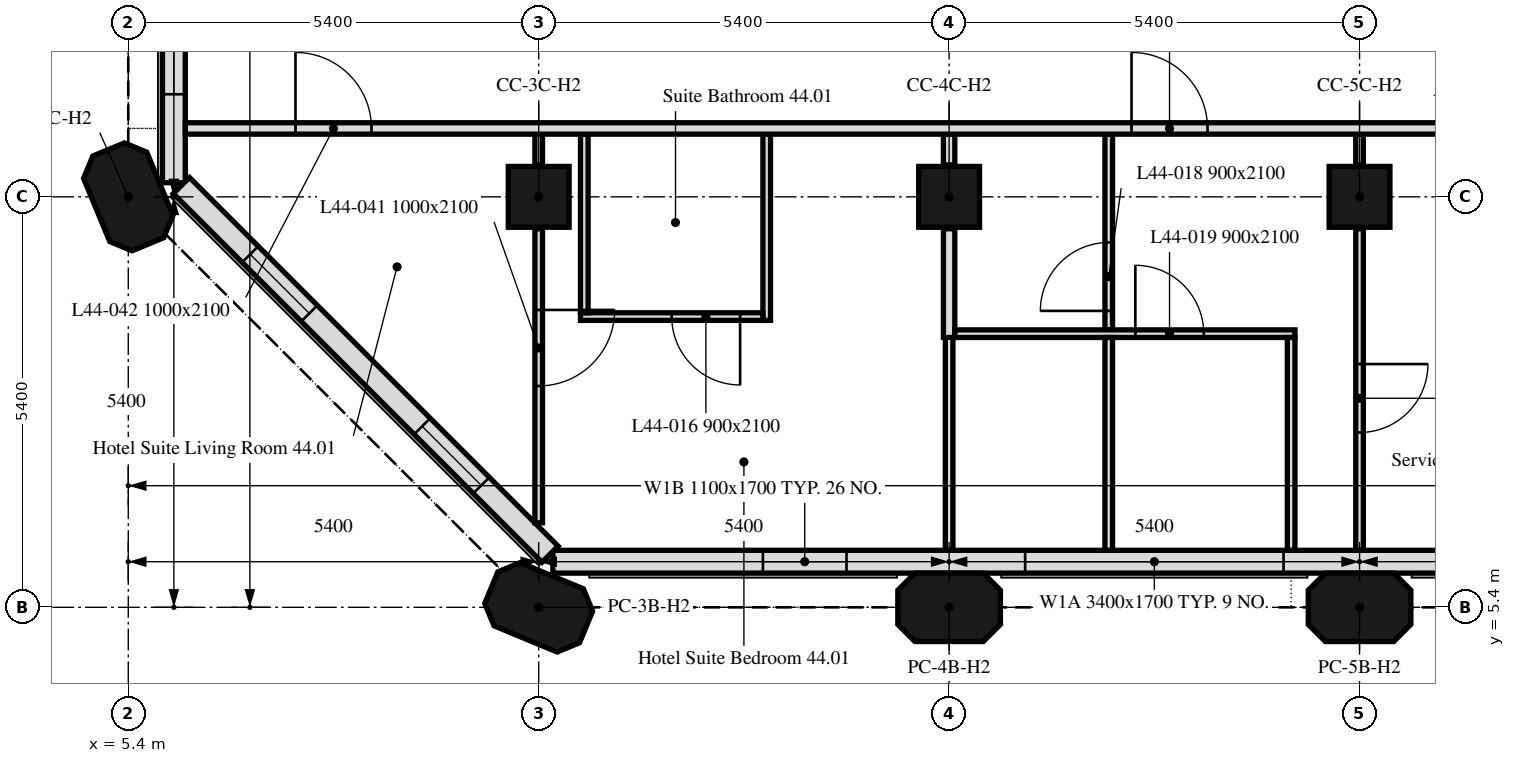
"""IFC4 building model, lengths in metres.
Left out: names, types, materials, properties, quantities, classifications, styles, units other than length and angle.
Written with IfcOpenShell. Run it as: python <this file> out.ifc"""

import sys

from ifc_helpers import new_model, si_unit, direction, frame, frame_2d, origin, origin_2d, place, context, subcontext, project, spatial, polyline, rectangle, outline, extrude, element, fill, save


model = new_model("IFC4")
c1 = context("Model", 3, precision=1e-05, world=origin(), true_north=direction((0.0, 1.0)))
c2 = subcontext(c1, "Body", "Model", "MODEL_VIEW")
j1 = project(units=[si_unit("LENGTHUNIT", "METRE"), si_unit("PLANEANGLEUNIT", "RADIAN")], contexts=[c1])
p1 = place(None, origin())
s1 = spatial("IfcSite", under=j1, at=p1, CompositionType="ELEMENT")
p2 = place(p1, origin())
s2 = spatial("IfcBuilding", under=s1, at=p2, CompositionType="ELEMENT")
p3 = place(p2, frame((0.0, 0.0, 184.0)))
s3 = spatial("IfcBuildingStorey", under=s2, at=p3, CompositionType="ELEMENT", Elevation=184.0)
for number, where, z_axis, x_axis in (
    (1, (10.8, 5.4, 0.0), (0.0, 0.0, 1.0), (-0.924, 0.383, 0.0)),
    (2, (16.2, 5.4, 0.0), (0.0, 0.0, 1.0), (1.0, 0.0, 0.0)),
    (3, (21.6, 5.4, 0.0), (0.0, 0.0, 1.0), (1.0, 0.0, 0.0)),
    (4, (5.4, 10.8, 0.0), (0.0, 0.0, 1.0), (-0.383, 0.924, 0.0)),
):
    element("IfcColumn", number, at=place(p3, frame(where, z_axis=z_axis, x_axis=x_axis)), inside=s3, PredefinedType="COLUMN", context=c2, shape_type="SweptSolid", body=[
        extrude(outline(polyline([(-0.45, -0.45), (0.45, -0.45), (0.675, -0.225), (0.675, 0.225), (0.45, 0.45), (-0.45, 0.45), (-0.675, 0.225), (-0.675, -0.225), (-0.45, -0.45)])), origin(), (0.0, 0.0, 1.0), 3.0),
    ])
for number, where, z_axis, x_axis in (
    (5, (10.8, 10.8, 0.0), (0.0, 0.0, 1.0), (1.0, 0.0, 0.0)),
    (6, (16.2, 10.8, 0.0), (0.0, 0.0, 1.0), (1.0, 0.0, 0.0)),
    (7, (21.6, 10.8, 0.0), (0.0, 0.0, 1.0), (1.0, 0.0, 0.0)),
):
    element("IfcColumn", number, at=place(p3, frame(where, z_axis=z_axis, x_axis=x_axis)), inside=s3, PredefinedType="COLUMN", context=c2, shape_type="SweptSolid", body=[
        extrude(rectangle(XDim=0.8, YDim=0.8, at=origin_2d()), origin(), (0.0, 0.0, 1.0), 3.0),
    ])
p4 = place(p3, frame((10.986, 6.0, 0.0), z_axis=(0.0, 0.0, 1.0), x_axis=(1.0, 0.0, 0.0)))
e8 = element("IfcWall", 8, at=p4, inside=s3, PredefinedType="SOLIDWALL", context=c2, shape_type="SweptSolid", body=[
    extrude(rectangle(XDim=32.027, YDim=0.3, at=frame_2d((16.014, 0.0))), origin(), (0.0, 0.0, 1.0), 3.0),
])
p5 = place(p4, frame((2.764, 0.0, 0.9)))
e9 = element("IfcOpeningElement", 9, at=p5, cuts=e8, PredefinedType="OPENING", context=c2, shape_type="SweptSolid", body=[
    extrude(rectangle(XDim=1.1, YDim=1.7, at=frame_2d((0.55, 0.85))), frame((0.0, 0.16, 0.0), z_axis=(0.0, -1.0, 0.0), x_axis=(1.0, 0.0, 0.0)), (0.0, 0.0, 1.0), 0.32),
])
p6 = place(p4, frame((6.214, 0.0, 0.9)))
e10 = element("IfcOpeningElement", 10, at=p6, cuts=e8, PredefinedType="OPENING", context=c2, shape_type="SweptSolid", body=[
    extrude(rectangle(XDim=3.4, YDim=1.7, at=frame_2d((1.7, 0.85))), frame((0.0, 0.16, 0.0), z_axis=(0.0, -1.0, 0.0), x_axis=(1.0, 0.0, 0.0)), (0.0, 0.0, 1.0), 0.32),
])
p7 = place(p4, frame((13.564, 0.0, 0.9)))
e11 = element("IfcOpeningElement", 11, at=p7, cuts=e8, PredefinedType="OPENING", context=c2, shape_type="SweptSolid", body=[
    extrude(rectangle(XDim=1.1, YDim=1.7, at=frame_2d((0.55, 0.85))), frame((0.0, 0.16, 0.0), z_axis=(0.0, -1.0, 0.0), x_axis=(1.0, 0.0, 0.0)), (0.0, 0.0, 1.0), 0.32),
])
p8 = place(p4, frame((17.014, 0.0, 0.9)))
e12 = element("IfcOpeningElement", 12, at=p8, cuts=e8, PredefinedType="OPENING", context=c2, shape_type="SweptSolid", body=[
    extrude(rectangle(XDim=3.4, YDim=1.7, at=frame_2d((1.7, 0.85))), frame((0.0, 0.16, 0.0), z_axis=(0.0, -1.0, 0.0), x_axis=(1.0, 0.0, 0.0)), (0.0, 0.0, 1.0), 0.32),
])
p9 = place(p4, frame((24.364, 0.0, 0.9)))
e13 = element("IfcOpeningElement", 13, at=p9, cuts=e8, PredefinedType="OPENING", context=c2, shape_type="SweptSolid", body=[
    extrude(rectangle(XDim=1.1, YDim=1.7, at=frame_2d((0.55, 0.85))), frame((0.0, 0.16, 0.0), z_axis=(0.0, -1.0, 0.0), x_axis=(1.0, 0.0, 0.0)), (0.0, 0.0, 1.0), 0.32),
])
p10 = place(p4, frame((27.814, 0.0, 0.9)))
e14 = element("IfcOpeningElement", 14, at=p10, cuts=e8, PredefinedType="OPENING", context=c2, shape_type="SweptSolid", body=[
    extrude(rectangle(XDim=3.4, YDim=1.7, at=frame_2d((1.7, 0.85))), frame((0.0, 0.16, 0.0), z_axis=(0.0, -1.0, 0.0), x_axis=(1.0, 0.0, 0.0)), (0.0, 0.0, 1.0), 0.32),
])
p11 = place(p3, frame((6.0, 16.2, 0.0), z_axis=(0.0, 0.0, 1.0), x_axis=(0.0, -1.0, 0.0)))
e15 = element("IfcWall", 15, at=p11, inside=s3, PredefinedType="SOLIDWALL", context=c2, shape_type="SweptSolid", body=[
    extrude(rectangle(XDim=5.214, YDim=0.3, at=frame_2d((2.607, 0.0))), origin(), (0.0, 0.0, 1.0), 3.0),
])
p12 = place(p11, frame((1.35, 0.0, 0.9)))
e16 = element("IfcOpeningElement", 16, at=p12, cuts=e15, PredefinedType="OPENING", context=c2, shape_type="SweptSolid", body=[
    extrude(rectangle(XDim=1.1, YDim=1.7, at=frame_2d((0.55, 0.85))), frame((0.0, 0.16, 0.0), z_axis=(0.0, -1.0, 0.0), x_axis=(1.0, 0.0, 0.0)), (0.0, 0.0, 1.0), 0.32),
])
p13 = place(p11, frame((2.95, 0.0, 0.9)))
e17 = element("IfcOpeningElement", 17, at=p13, cuts=e15, PredefinedType="OPENING", context=c2, shape_type="SweptSolid", body=[
    extrude(rectangle(XDim=1.1, YDim=1.7, at=frame_2d((0.55, 0.85))), frame((0.0, 0.16, 0.0), z_axis=(0.0, -1.0, 0.0), x_axis=(1.0, 0.0, 0.0)), (0.0, 0.0, 1.0), 0.32),
])
p14 = place(p3, frame((6.099, 10.949, 0.0), z_axis=(0.0, 0.0, 1.0), x_axis=(0.707106781187, -0.707106781187, 0.0)))
e18 = element("IfcWall", 18, at=p14, inside=s3, PredefinedType="SOLIDWALL", context=c2, shape_type="SweptSolid", body=[
    extrude(rectangle(XDim=6.86, YDim=0.3, at=frame_2d((3.43, 0.0))), origin(), (0.0, 0.0, 1.0), 3.0),
])
p15 = place(p14, frame((1.28, 0.0, 0.9)))
e19 = element("IfcOpeningElement", 19, at=p15, cuts=e18, PredefinedType="OPENING", context=c2, shape_type="SweptSolid", body=[
    extrude(rectangle(XDim=1.1, YDim=1.7, at=frame_2d((0.55, 0.85))), frame((0.0, 0.16, 0.0), z_axis=(0.0, -1.0, 0.0), x_axis=(1.0, 0.0, 0.0)), (0.0, 0.0, 1.0), 0.32),
])
p16 = place(p14, frame((4.48, 0.0, 0.9)))
e20 = element("IfcOpeningElement", 20, at=p16, cuts=e18, PredefinedType="OPENING", context=c2, shape_type="SweptSolid", body=[
    extrude(rectangle(XDim=1.1, YDim=1.7, at=frame_2d((0.55, 0.85))), frame((0.0, 0.16, 0.0), z_axis=(0.0, -1.0, 0.0), x_axis=(1.0, 0.0, 0.0)), (0.0, 0.0, 1.0), 0.32),
])
p17 = place(p3, frame((16.2, 6.151, 0.0), z_axis=(0.0, 0.0, 1.0), x_axis=(0.0, 1.0, 0.0)))
e21 = element("IfcWall", 21, at=p17, inside=s3, PredefinedType="PARTITIONING", context=c2, shape_type="SweptSolid", body=[
    extrude(rectangle(XDim=2.899, YDim=0.1, at=frame_2d((1.45, 0.0))), origin(), (0.0, 0.0, 1.0), 3.0),
])
p18 = place(p3, frame((16.2, 8.95, 0.0), z_axis=(0.0, 0.0, 1.0), x_axis=(0.0, 1.0, 0.0)))
e22 = element("IfcWall", 22, at=p18, inside=s3, PredefinedType="PARTITIONING", context=c2, shape_type="SweptSolid", body=[
    extrude(rectangle(XDim=1.43, YDim=0.15, at=frame_2d((0.715, 0.0))), origin(), (0.0, 0.0, 1.0), 3.0),
])
p19 = place(p3, frame((16.2, 11.22, 0.0), z_axis=(0.0, 0.0, 1.0), x_axis=(0.0, 1.0, 0.0)))
e23 = element("IfcWall", 23, at=p19, inside=s3, PredefinedType="PARTITIONING", context=c2, shape_type="SweptSolid", body=[
    extrude(rectangle(XDim=0.405, YDim=0.15, at=frame_2d((0.203, 0.0))), origin(), (0.0, 0.0, 1.0), 3.0),
])
p20 = place(p3, frame((13.8, 11.625, 0.0), z_axis=(0.0, 0.0, 1.0), x_axis=(0.0, -1.0, 0.0)))
e24 = element("IfcWall", 24, at=p20, inside=s3, PredefinedType="PARTITIONING", context=c2, shape_type="SweptSolid", body=[
    extrude(rectangle(XDim=2.45, YDim=0.1, at=frame_2d((1.225, 0.0))), origin(), (0.0, 0.0, 1.0), 3.0),
])
p21 = place(p3, frame((13.75, 9.225, 0.0), z_axis=(0.0, 0.0, 1.0), x_axis=(-1.0, 0.0, 0.0)))
e25 = element("IfcWall", 25, at=p21, inside=s3, PredefinedType="PARTITIONING", context=c2, shape_type="SweptSolid", body=[
    extrude(rectangle(XDim=2.4, YDim=0.1, at=frame_2d((1.2, 0.0))), origin(), (0.0, 0.0, 1.0), 3.0),
])
p22 = place(p21, frame((0.3, 0.0, 0.0)))
e26 = element("IfcOpeningElement", 26, at=p22, cuts=e25, PredefinedType="OPENING", context=c2, shape_type="SweptSolid", body=[
    extrude(rectangle(XDim=0.9, YDim=2.1, at=frame_2d((0.45, 1.05))), frame((0.0, 0.05, 0.0), z_axis=(0.0, -1.0, 0.0), x_axis=(1.0, 0.0, 0.0)), (0.0, 0.0, 1.0), 0.1),
])
p23 = place(p3, frame((11.4, 9.275, 0.0), z_axis=(0.0, 0.0, 1.0), x_axis=(0.0, 1.0, 0.0)))
e27 = element("IfcWall", 27, at=p23, inside=s3, PredefinedType="PARTITIONING", context=c2, shape_type="SweptSolid", body=[
    extrude(rectangle(XDim=2.35, YDim=0.1, at=frame_2d((1.175, 0.0))), origin(), (0.0, 0.0, 1.0), 3.0),
])
p24 = place(p3, frame((10.8, 11.625, 0.0), z_axis=(0.0, 0.0, 1.0), x_axis=(0.0, -1.0, 0.0)))
e28 = element("IfcWall", 28, at=p24, inside=s3, PredefinedType="PARTITIONING", context=c2, shape_type="SweptSolid", body=[
    extrude(rectangle(XDim=0.405, YDim=0.1, at=frame_2d((0.203, 0.0))), origin(), (0.0, 0.0, 1.0), 3.0),
])
p25 = place(p3, frame((10.8, 10.38, 0.0), z_axis=(0.0, 0.0, 1.0), x_axis=(0.0, -1.0, 0.0)))
e29 = element("IfcWall", 29, at=p25, inside=s3, PredefinedType="PARTITIONING", context=c2, shape_type="SweptSolid", body=[
    extrude(rectangle(XDim=3.868, YDim=0.1, at=frame_2d((1.934, 0.0))), origin(), (0.0, 0.0, 1.0), 3.0),
])
p26 = place(p25, frame((1.067, 0.0, 0.0)))
e30 = element("IfcOpeningElement", 30, at=p26, cuts=e29, PredefinedType="OPENING", context=c2, shape_type="SweptSolid", body=[
    extrude(rectangle(XDim=1.0, YDim=2.1, at=frame_2d((0.5, 1.05))), frame((0.0, 0.05, 0.0), z_axis=(0.0, -1.0, 0.0), x_axis=(1.0, 0.0, 0.0)), (0.0, 0.0, 1.0), 0.1),
])
p27 = place(p3, frame((21.6, 11.625, 0.0), z_axis=(0.0, 0.0, 1.0), x_axis=(0.0, -1.0, 0.0)))
e31 = element("IfcWall", 31, at=p27, inside=s3, PredefinedType="PARTITIONING", context=c2, shape_type="SweptSolid", body=[
    extrude(rectangle(XDim=0.405, YDim=0.1, at=frame_2d((0.203, 0.0))), origin(), (0.0, 0.0, 1.0), 3.0),
])
p28 = place(p3, frame((21.6, 10.38, 0.0), z_axis=(0.0, 0.0, 1.0), x_axis=(0.0, -1.0, 0.0)))
e32 = element("IfcWall", 32, at=p28, inside=s3, PredefinedType="PARTITIONING", context=c2, shape_type="SweptSolid", body=[
    extrude(rectangle(XDim=4.229, YDim=0.1, at=frame_2d((2.115, 0.0))), origin(), (0.0, 0.0, 1.0), 3.0),
])
p29 = place(p28, frame((1.78, 0.0, 0.0)))
e33 = element("IfcOpeningElement", 33, at=p29, cuts=e32, PredefinedType="OPENING", context=c2, shape_type="SweptSolid", body=[
    extrude(rectangle(XDim=0.9, YDim=2.1, at=frame_2d((0.45, 1.05))), frame((0.0, 0.05, 0.0), z_axis=(0.0, -1.0, 0.0), x_axis=(1.0, 0.0, 0.0)), (0.0, 0.0, 1.0), 0.1),
])
p30 = place(p3, frame((18.3, 9.05, 0.0), z_axis=(0.0, 0.0, 1.0), x_axis=(0.0, 1.0, 0.0)))
e34 = element("IfcWall", 34, at=p30, inside=s3, PredefinedType="PARTITIONING", context=c2, shape_type="SweptSolid", body=[
    extrude(rectangle(XDim=2.575, YDim=0.1, at=frame_2d((1.288, 0.0))), origin(), (0.0, 0.0, 1.0), 3.0),
])
p31 = place(p30, frame((0.25, 0.0, 0.0)))
e35 = element("IfcOpeningElement", 35, at=p31, cuts=e34, PredefinedType="OPENING", context=c2, shape_type="SweptSolid", body=[
    extrude(rectangle(XDim=0.9, YDim=2.1, at=frame_2d((0.45, 1.05))), frame((0.0, 0.05, 0.0), z_axis=(0.0, -1.0, 0.0), x_axis=(1.0, 0.0, 0.0)), (0.0, 0.0, 1.0), 0.1),
])
p32 = place(p3, frame((16.275, 9.0, 0.0), z_axis=(0.0, 0.0, 1.0), x_axis=(1.0, 0.0, 0.0)))
e36 = element("IfcWall", 36, at=p32, inside=s3, PredefinedType="PARTITIONING", context=c2, shape_type="SweptSolid", body=[
    extrude(rectangle(XDim=4.475, YDim=0.1, at=frame_2d((2.238, 0.0))), origin(), (0.0, 0.0, 1.0), 3.0),
])
p33 = place(p32, frame((2.375, 0.0, 0.0)))
e37 = element("IfcOpeningElement", 37, at=p33, cuts=e36, PredefinedType="OPENING", context=c2, shape_type="SweptSolid", body=[
    extrude(rectangle(XDim=0.9, YDim=2.1, at=frame_2d((0.45, 1.05))), frame((0.0, 0.05, 0.0), z_axis=(0.0, -1.0, 0.0), x_axis=(1.0, 0.0, 0.0)), (0.0, 0.0, 1.0), 0.1),
])
for number, where, z_axis, x_axis in (
    (38, (20.7, 8.95, 0.0), (0.0, 0.0, 1.0), (0.0, -1.0, 0.0)),
    (39, (18.3, 8.95, 0.0), (0.0, 0.0, 1.0), (0.0, -1.0, 0.0)),
):
    element("IfcWall", number, at=place(p3, frame(where, z_axis=z_axis, x_axis=x_axis)), inside=s3, PredefinedType="PARTITIONING", context=c2, shape_type="SweptSolid", body=[
        extrude(rectangle(XDim=2.799, YDim=0.1, at=frame_2d((1.399, 0.0))), origin(), (0.0, 0.0, 1.0), 3.0),
    ])
p34 = place(p3, frame((6.151, 11.7, 0.0), z_axis=(0.0, 0.0, 1.0), x_axis=(1.0, 0.0, 0.0)))
e40 = element("IfcWall", 40, at=p34, inside=s3, PredefinedType="PARTITIONING", context=c2, shape_type="SweptSolid", body=[
    extrude(rectangle(XDim=41.698, YDim=0.15, at=frame_2d((20.849, 0.0))), origin(), (0.0, 0.0, 1.0), 3.0),
])
p35 = place(p34, frame((1.449, 0.0, 0.0)))
e41 = element("IfcOpeningElement", 41, at=p35, cuts=e40, PredefinedType="OPENING", context=c2, shape_type="SweptSolid", body=[
    extrude(rectangle(XDim=1.0, YDim=2.1, at=frame_2d((0.5, 1.05))), frame((0.0, 0.075, 0.0), z_axis=(0.0, -1.0, 0.0), x_axis=(1.0, 0.0, 0.0)), (0.0, 0.0, 1.0), 0.15),
])
p36 = place(p34, frame((37.954, 0.0, 0.0)))
e42 = element("IfcOpeningElement", 42, at=p36, cuts=e40, PredefinedType="OPENING", context=c2, shape_type="SweptSolid", body=[
    extrude(rectangle(XDim=1.0, YDim=2.1, at=frame_2d((0.5, 1.05))), frame((0.0, 0.075, 0.0), z_axis=(0.0, -1.0, 0.0), x_axis=(1.0, 0.0, 0.0)), (0.0, 0.0, 1.0), 0.15),
])
p37 = place(p34, frame((12.449, 0.0, 0.0)))
e43 = element("IfcOpeningElement", 43, at=p37, cuts=e40, PredefinedType="OPENING", context=c2, shape_type="SweptSolid", body=[
    extrude(rectangle(XDim=1.0, YDim=2.1, at=frame_2d((0.5, 1.05))), frame((0.0, 0.075, 0.0), z_axis=(0.0, -1.0, 0.0), x_axis=(1.0, 0.0, 0.0)), (0.0, 0.0, 1.0), 0.15),
])
p38 = place(p34, frame((23.249, 0.0, 0.0)))
e44 = element("IfcOpeningElement", 44, at=p38, cuts=e40, PredefinedType="OPENING", context=c2, shape_type="SweptSolid", body=[
    extrude(rectangle(XDim=1.0, YDim=2.1, at=frame_2d((0.5, 1.05))), frame((0.0, 0.075, 0.0), z_axis=(0.0, -1.0, 0.0), x_axis=(1.0, 0.0, 0.0)), (0.0, 0.0, 1.0), 0.15),
])
p39 = place(p5, origin())
e45 = element("IfcWindow", 45, at=p39, inside=s3, PartitioningType="SINGLE_PANEL", PredefinedType="WINDOW", context=c2, shape_type="SweptSolid", body=[
    extrude(rectangle(XDim=1.1, YDim=1.7, at=frame_2d((0.55, 0.85))), frame((0.0, 0.03, 0.0), z_axis=(0.0, -1.0, 0.0), x_axis=(1.0, 0.0, 0.0)), (0.0, 0.0, 1.0), 0.06),
])
fill(e9, e45)
p40 = place(p6, origin())
e46 = element("IfcWindow", 46, at=p40, inside=s3, PartitioningType="SINGLE_PANEL", PredefinedType="WINDOW", context=c2, shape_type="SweptSolid", body=[
    extrude(rectangle(XDim=3.4, YDim=1.7, at=frame_2d((1.7, 0.85))), frame((0.0, 0.03, 0.0), z_axis=(0.0, -1.0, 0.0), x_axis=(1.0, 0.0, 0.0)), (0.0, 0.0, 1.0), 0.06),
])
fill(e10, e46)
p41 = place(p13, origin())
e47 = element("IfcWindow", 47, at=p41, inside=s3, PartitioningType="SINGLE_PANEL", PredefinedType="WINDOW", context=c2, shape_type="SweptSolid", body=[
    extrude(rectangle(XDim=1.1, YDim=1.7, at=frame_2d((0.55, 0.85))), frame((0.0, 0.03, 0.0), z_axis=(0.0, -1.0, 0.0), x_axis=(1.0, 0.0, 0.0)), (0.0, 0.0, 1.0), 0.06),
])
fill(e17, e47)
p42 = place(p15, origin())
e48 = element("IfcWindow", 48, at=p42, inside=s3, PartitioningType="SINGLE_PANEL", PredefinedType="WINDOW", context=c2, shape_type="SweptSolid", body=[
    extrude(rectangle(XDim=1.1, YDim=1.7, at=frame_2d((0.55, 0.85))), frame((0.0, 0.03, 0.0), z_axis=(0.0, -1.0, 0.0), x_axis=(1.0, 0.0, 0.0)), (0.0, 0.0, 1.0), 0.06),
])
fill(e19, e48)
p43 = place(p16, origin())
e49 = element("IfcWindow", 49, at=p43, inside=s3, PartitioningType="SINGLE_PANEL", PredefinedType="WINDOW", context=c2, shape_type="SweptSolid", body=[
    extrude(rectangle(XDim=1.1, YDim=1.7, at=frame_2d((0.55, 0.85))), frame((0.0, 0.03, 0.0), z_axis=(0.0, -1.0, 0.0), x_axis=(1.0, 0.0, 0.0)), (0.0, 0.0, 1.0), 0.06),
])
fill(e20, e49)
p44 = place(p22, origin())
e50 = element("IfcDoor", 50, at=p44, inside=s3, OperationType="SINGLE_SWING_LEFT", PredefinedType="DOOR", context=c2, shape_type="SweptSolid", body=[
    extrude(rectangle(XDim=0.9, YDim=2.1, at=frame_2d((0.45, 1.05))), frame((0.0, 0.025, 0.0), z_axis=(0.0, -1.0, 0.0), x_axis=(1.0, 0.0, 0.0)), (0.0, 0.0, 1.0), 0.05),
])
fill(e26, e50)
p45 = place(p31, origin())
e51 = element("IfcDoor", 51, at=p45, inside=s3, OperationType="SINGLE_SWING_LEFT", PredefinedType="DOOR", context=c2, shape_type="SweptSolid", body=[
    extrude(rectangle(XDim=0.9, YDim=2.1, at=frame_2d((0.45, 1.05))), frame((0.0, 0.025, 0.0), z_axis=(0.0, -1.0, 0.0), x_axis=(1.0, 0.0, 0.0)), (0.0, 0.0, 1.0), 0.05),
])
fill(e35, e51)
p46 = place(p33, origin())
e52 = element("IfcDoor", 52, at=p46, inside=s3, OperationType="SINGLE_SWING_RIGHT", PredefinedType="DOOR", context=c2, shape_type="SweptSolid", body=[
    extrude(rectangle(XDim=0.9, YDim=2.1, at=frame_2d((0.45, 1.05))), frame((0.0, 0.025, 0.0), z_axis=(0.0, -1.0, 0.0), x_axis=(1.0, 0.0, 0.0)), (0.0, 0.0, 1.0), 0.05),
])
fill(e37, e52)
p47 = place(p26, origin())
e53 = element("IfcDoor", 53, at=p47, inside=s3, OperationType="SINGLE_SWING_LEFT", PredefinedType="DOOR", context=c2, shape_type="SweptSolid", body=[
    extrude(rectangle(XDim=1.0, YDim=2.1, at=frame_2d((0.5, 1.05))), frame((0.0, 0.025, 0.0), z_axis=(0.0, -1.0, 0.0), x_axis=(1.0, 0.0, 0.0)), (0.0, 0.0, 1.0), 0.05),
])
fill(e30, e53)
p48 = place(p35, origin())
e54 = element("IfcDoor", 54, at=p48, inside=s3, OperationType="SINGLE_SWING_RIGHT", PredefinedType="DOOR", context=c2, shape_type="SweptSolid", body=[
    extrude(rectangle(XDim=1.0, YDim=2.1, at=frame_2d((0.5, 1.05))), frame((0.0, 0.025, 0.0), z_axis=(0.0, -1.0, 0.0), x_axis=(1.0, 0.0, 0.0)), (0.0, 0.0, 1.0), 0.05),
])
fill(e41, e54)
p49 = place(p29, origin())
e55 = element("IfcDoor", 55, at=p49, inside=s3, OperationType="SINGLE_SWING_LEFT", PredefinedType="DOOR", context=c2, shape_type="SweptSolid", body=[
    extrude(rectangle(XDim=0.9, YDim=2.1, at=frame_2d((0.45, 1.05))), frame((0.0, 0.025, 0.0), z_axis=(0.0, -1.0, 0.0), x_axis=(1.0, 0.0, 0.0)), (0.0, 0.0, 1.0), 0.05),
])
fill(e33, e55)
p50 = place(p37, origin())
e56 = element("IfcDoor", 56, at=p50, inside=s3, OperationType="SINGLE_SWING_LEFT", PredefinedType="DOOR", context=c2, shape_type="SweptSolid", body=[
    extrude(rectangle(XDim=1.0, YDim=2.1, at=frame_2d((0.5, 1.05))), frame((0.0, 0.025, 0.0), z_axis=(0.0, -1.0, 0.0), x_axis=(1.0, 0.0, 0.0)), (0.0, 0.0, 1.0), 0.05),
])
fill(e43, e56)
save(model, sys.argv[1])
